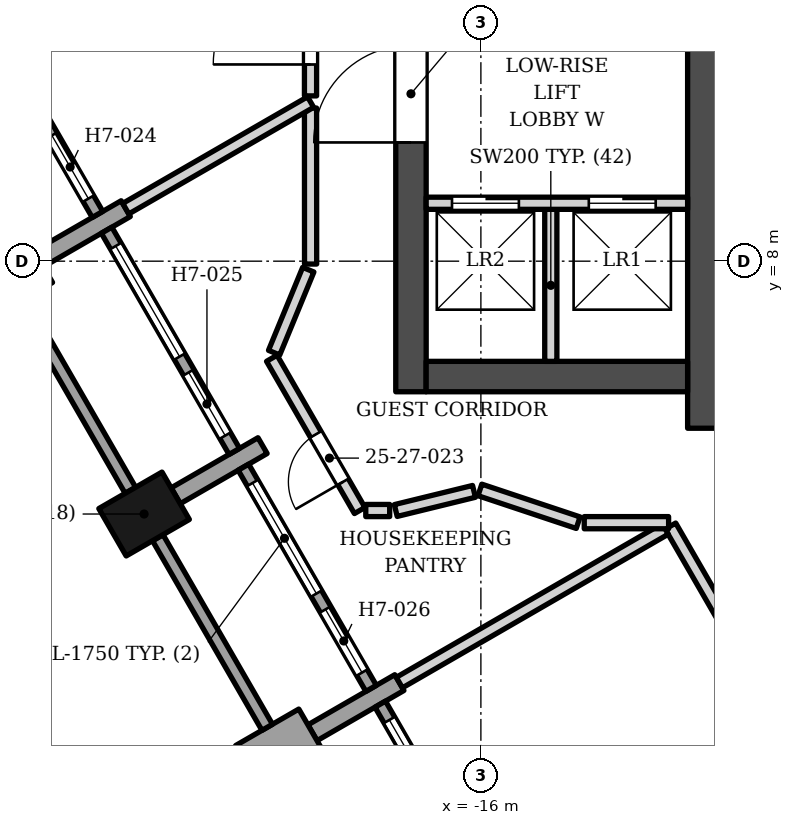
"""IFC4 building model, lengths in metres.
Left out: names, types, materials, properties, quantities, classifications, styles, units other than length and angle.
Written with IfcOpenShell. Run it as: python <this file> out.ifc"""

import sys

from ifc_helpers import new_model, si_unit, direction, frame, frame_2d, origin, origin_2d, place, context, subcontext, project, spatial, rectangle, extrude, element, fill, save


model = new_model("IFC4")
c1 = context("Model", 3, precision=1e-05, world=origin(), true_north=direction((0.0, 1.0)))
c2 = subcontext(c1, "Body", "Model", "MODEL_VIEW")
j1 = project(units=[si_unit("LENGTHUNIT", "METRE"), si_unit("PLANEANGLEUNIT", "RADIAN")], contexts=[c1])
p1 = place(None, origin())
s1 = spatial("IfcSite", under=j1, at=p1, CompositionType="ELEMENT")
p2 = place(p1, origin())
s2 = spatial("IfcBuilding", under=s1, at=p2, CompositionType="ELEMENT")
p3 = place(p2, frame((0.0, 0.0, 112.2)))
s3 = spatial("IfcBuildingStorey", under=s2, at=p3, CompositionType="ELEMENT", Elevation=112.2)
p4 = place(p3, frame((-12.35, 5.253, 0.0), z_axis=(0.0, 0.0, 1.0), x_axis=(0.0, 1.0, 0.0)))
e1 = element("IfcWall", 1, at=p4, inside=s3, PredefinedType="SHEAR", context=c2, shape_type="SweptSolid", body=[
    extrude(rectangle(XDim=13.3, YDim=0.5, at=frame_2d((6.65, 0.0))), origin(), (0.0, 0.0, 1.0), 3.4),
])
p5 = place(p3, frame((-12.6, 6.103, 0.0), z_axis=(0.0, 0.0, 1.0), x_axis=(-1.0, 0.0, 0.0)))
e2 = element("IfcWall", 2, at=p5, inside=s3, PredefinedType="SHEAR", context=c2, shape_type="SweptSolid", body=[
    extrude(rectangle(XDim=4.3, YDim=0.5, at=frame_2d((2.15, 0.0))), origin(), (0.0, 0.0, 1.0), 3.4),
])
p6 = place(p3, frame((-17.15, 5.853, 0.0), z_axis=(0.0, 0.0, 1.0), x_axis=(0.0, 1.0, 0.0)))
e3 = element("IfcWall", 3, at=p6, inside=s3, PredefinedType="SHEAR", context=c2, shape_type="SweptSolid", body=[
    extrude(rectangle(XDim=13.2, YDim=0.5, at=frame_2d((6.6, 0.0))), origin(), (0.0, 0.0, 1.0), 3.4),
])
p7 = place(p6, frame((4.1, 0.0, 0.0)))
e4 = element("IfcOpeningElement", 4, at=p7, cuts=e3, PredefinedType="OPENING", context=c2, shape_type="SweptSolid", body=[
    extrude(rectangle(XDim=1.6, YDim=2.1, at=frame_2d((0.8, 1.05))), frame((0.0, 0.26, 0.0), z_axis=(0.0, -1.0, 0.0), x_axis=(1.0, 0.0, 0.0)), (0.0, 0.0, 1.0), 0.52),
])
p8 = place(p6, frame((9.75, 0.0, 0.0)))
e5 = element("IfcOpeningElement", 5, at=p8, cuts=e3, PredefinedType="OPENING", context=c2, shape_type="SweptSolid", body=[
    extrude(rectangle(XDim=0.9, YDim=2.1, at=frame_2d((0.45, 1.05))), frame((0.0, 0.26, 0.0), z_axis=(0.0, -1.0, 0.0), x_axis=(1.0, 0.0, 0.0)), (0.0, 0.0, 1.0), 0.52),
])
p9 = place(p3, frame((-21.539, 3.842, 0.0), z_axis=(0.0, 0.0, 1.0), x_axis=(0.5, -0.866025403784, 0.0)))
e6 = element("IfcColumn", 6, at=p9, inside=s3, PredefinedType="COLUMN", context=c2, shape_type="SweptSolid", body=[
    extrude(rectangle(XDim=0.9, YDim=1.2, at=origin_2d()), origin(), (0.0, 0.0, 1.0), 3.4),
])
p10 = place(p3, frame((-24.309, 7.439, 0.0), z_axis=(0.0, 0.0, 1.0), x_axis=(0.865955154139, 0.50012165622, 0.0)))
e7 = element("IfcWall", 7, at=p10, inside=s3, PredefinedType="SOLIDWALL", context=c2, shape_type="SweptSolid", body=[
    extrude(rectangle(XDim=1.2, YDim=0.9, at=frame_2d((0.6, 0.0))), origin(), (0.0, 0.0, 1.0), 2.63),
])
p11 = place(p3, frame((-23.27, 8.039, 0.0), z_axis=(0.0, 0.0, 1.0), x_axis=(0.866040211805, 0.499974350878, 0.0)))
e8 = element("IfcWall", 8, at=p11, inside=s3, PredefinedType="SOLIDWALL", context=c2, shape_type="SweptSolid", body=[
    extrude(rectangle(XDim=1.65, YDim=0.3, at=frame_2d((0.825, 0.0))), origin(), (0.0, 0.0, 1.0), 2.65),
])
p12 = place(p3, frame((-21.019, 4.142, 0.0), z_axis=(0.0, 0.0, 1.0), x_axis=(0.866003217194, 0.500038426333, 0.0)))
e9 = element("IfcWall", 9, at=p12, inside=s3, PredefinedType="SOLIDWALL", context=c2, shape_type="SweptSolid", body=[
    extrude(rectangle(XDim=1.65, YDim=0.3, at=frame_2d((0.825, 0.0))), origin(), (0.0, 0.0, 1.0), 2.45),
])
p13 = place(p3, frame((-19.809, -0.355, 0.0), z_axis=(0.0, 0.0, 1.0), x_axis=(0.866043267704, 0.499969057507, 0.0)))
e10 = element("IfcWall", 10, at=p13, inside=s3, PredefinedType="SOLIDWALL", context=c2, shape_type="SweptSolid", body=[
    extrude(rectangle(XDim=1.2, YDim=0.9, at=frame_2d((0.6, 0.0))), origin(), (0.0, 0.0, 1.0), 2.63),
])
p14 = place(p3, frame((-18.77, 0.245, 0.0), z_axis=(0.0, 0.0, 1.0), x_axis=(0.865976140824, 0.500085316245, 0.0)))
e11 = element("IfcWall", 11, at=p14, inside=s3, PredefinedType="SOLIDWALL", context=c2, shape_type="SweptSolid", body=[
    extrude(rectangle(XDim=1.65, YDim=0.3, at=frame_2d((0.825, 0.0))), origin(), (0.0, 0.0, 1.0), 2.65),
])
p15 = place(p3, frame((-24.405, 12.406, 0.0), z_axis=(0.0, 0.0, 1.0), x_axis=(0.500002543286, -0.866023935413, 0.0)))
e12 = element("IfcWall", 12, at=p15, inside=s3, PredefinedType="ELEMENTEDWALL", context=c2, shape_type="SweptSolid", body=[
    extrude(rectangle(XDim=4.2, YDim=0.2, at=frame_2d((2.1, 0.0))), origin(), (0.0, 0.0, 1.0), 2.65),
])
p16 = place(p15, frame((0.3, 0.0, 0.6)))
e13 = element("IfcOpeningElement", 13, at=p16, cuts=e12, PredefinedType="OPENING", context=c2, shape_type="SweptSolid", body=[
    extrude(rectangle(XDim=2.1, YDim=1.8, at=frame_2d((1.05, 0.9))), frame((0.0, 0.11, 0.0), z_axis=(0.0, -1.0, 0.0), x_axis=(1.0, 0.0, 0.0)), (0.0, 0.0, 1.0), 0.22),
])
p17 = place(p15, frame((2.7, 0.0, 0.0)))
e14 = element("IfcOpeningElement", 14, at=p17, cuts=e12, PredefinedType="OPENING", context=c2, shape_type="SweptSolid", body=[
    extrude(rectangle(XDim=1.2, YDim=2.4, at=frame_2d((0.6, 1.2))), frame((0.0, 0.11, 0.0), z_axis=(0.0, -1.0, 0.0), x_axis=(1.0, 0.0, 0.0)), (0.0, 0.0, 1.0), 0.22),
])
p18 = place(p3, frame((-23.564, 7.349, 0.0), z_axis=(0.0, 0.0, 1.0), x_axis=(0.500012057535, -0.866018442252, 0.0)))
e15 = element("IfcWall", 15, at=p18, inside=s3, PredefinedType="SOLIDWALL", context=c2, shape_type="SweptSolid", body=[
    extrude(rectangle(XDim=3.6, YDim=0.2, at=frame_2d((1.8, 0.0))), origin(), (0.0, 0.0, 1.0), 2.63),
])
p19 = place(p3, frame((-22.155, 8.509, 0.0), z_axis=(0.0, 0.0, 1.0), x_axis=(0.500027713859, -0.866009402589, 0.0)))
e16 = element("IfcWall", 16, at=p19, inside=s3, PredefinedType="ELEMENTEDWALL", context=c2, shape_type="SweptSolid", body=[
    extrude(rectangle(XDim=4.2, YDim=0.2, at=frame_2d((2.1, 0.0))), origin(), (0.0, 0.0, 1.0), 2.65),
])
p20 = place(p19, frame((0.3, 0.0, 0.6)))
e17 = element("IfcOpeningElement", 17, at=p20, cuts=e16, PredefinedType="OPENING", context=c2, shape_type="SweptSolid", body=[
    extrude(rectangle(XDim=2.1, YDim=1.8, at=frame_2d((1.05, 0.9))), frame((0.0, 0.11, 0.0), z_axis=(0.0, -1.0, 0.0), x_axis=(1.0, 0.0, 0.0)), (0.0, 0.0, 1.0), 0.22),
])
p21 = place(p19, frame((2.7, 0.0, 0.0)))
e18 = element("IfcOpeningElement", 18, at=p21, cuts=e16, PredefinedType="OPENING", context=c2, shape_type="SweptSolid", body=[
    extrude(rectangle(XDim=1.2, YDim=2.4, at=frame_2d((0.6, 1.2))), frame((0.0, 0.11, 0.0), z_axis=(0.0, -1.0, 0.0), x_axis=(1.0, 0.0, 0.0)), (0.0, 0.0, 1.0), 0.22),
])
p22 = place(p3, frame((-21.314, 3.452, 0.0), z_axis=(0.0, 0.0, 1.0), x_axis=(0.500012057535, -0.866018442252, 0.0)))
e19 = element("IfcWall", 19, at=p22, inside=s3, PredefinedType="SOLIDWALL", context=c2, shape_type="SweptSolid", body=[
    extrude(rectangle(XDim=3.6, YDim=0.2, at=frame_2d((1.8, 0.0))), origin(), (0.0, 0.0, 1.0), 2.63),
])
p23 = place(p3, frame((-19.905, 4.612, 0.0), z_axis=(0.0, 0.0, 1.0), x_axis=(0.500027713859, -0.866009402589, 0.0)))
e20 = element("IfcWall", 20, at=p23, inside=s3, PredefinedType="ELEMENTEDWALL", context=c2, shape_type="SweptSolid", body=[
    extrude(rectangle(XDim=4.2, YDim=0.2, at=frame_2d((2.1, 0.0))), origin(), (0.0, 0.0, 1.0), 2.45),
])
p24 = place(p23, frame((0.3, 0.0, 0.6)))
e21 = element("IfcOpeningElement", 21, at=p24, cuts=e20, PredefinedType="OPENING", context=c2, shape_type="SweptSolid", body=[
    extrude(rectangle(XDim=2.1, YDim=1.75, at=frame_2d((1.05, 0.875))), frame((0.0, 0.11, 0.0), z_axis=(0.0, -1.0, 0.0), x_axis=(1.0, 0.0, 0.0)), (0.0, 0.0, 1.0), 0.22),
])
p25 = place(p23, frame((2.7, 0.0, 0.0)))
e22 = element("IfcOpeningElement", 22, at=p25, cuts=e20, PredefinedType="OPENING", context=c2, shape_type="SweptSolid", body=[
    extrude(rectangle(XDim=1.2, YDim=2.35, at=frame_2d((0.6, 1.175))), frame((0.0, 0.11, 0.0), z_axis=(0.0, -1.0, 0.0), x_axis=(1.0, 0.0, 0.0)), (0.0, 0.0, 1.0), 0.22),
])
p26 = place(p3, frame((-17.655, 0.715, 0.0), z_axis=(0.0, 0.0, 1.0), x_axis=(0.500002543286, -0.866023935413, 0.0)))
e23 = element("IfcWall", 23, at=p26, inside=s3, PredefinedType="ELEMENTEDWALL", context=c2, shape_type="SweptSolid", body=[
    extrude(rectangle(XDim=4.2, YDim=0.2, at=frame_2d((2.1, 0.0))), origin(), (0.0, 0.0, 1.0), 2.65),
])
p27 = place(p26, frame((0.3, 0.0, 0.6)))
e24 = element("IfcOpeningElement", 24, at=p27, cuts=e23, PredefinedType="OPENING", context=c2, shape_type="SweptSolid", body=[
    extrude(rectangle(XDim=2.1, YDim=1.8, at=frame_2d((1.05, 0.9))), frame((0.0, 0.11, 0.0), z_axis=(0.0, -1.0, 0.0), x_axis=(1.0, 0.0, 0.0)), (0.0, 0.0, 1.0), 0.22),
])
p28 = place(p26, frame((2.7, 0.0, 0.0)))
e25 = element("IfcOpeningElement", 25, at=p28, cuts=e23, PredefinedType="OPENING", context=c2, shape_type="SweptSolid", body=[
    extrude(rectangle(XDim=1.2, YDim=2.4, at=frame_2d((0.6, 1.2))), frame((0.0, 0.11, 0.0), z_axis=(0.0, -1.0, 0.0), x_axis=(1.0, 0.0, 0.0)), (0.0, 0.0, 1.0), 0.22),
])
p29 = place(p3, frame((-14.85, 6.353, 0.0), z_axis=(0.0, 0.0, 1.0), x_axis=(0.0, 1.0, 0.0)))
e26 = element("IfcWall", 26, at=p29, inside=s3, PredefinedType="SOLIDWALL", context=c2, shape_type="SweptSolid", body=[
    extrude(rectangle(XDim=2.5, YDim=0.2, at=frame_2d((1.25, 0.0))), origin(), (0.0, 0.0, 1.0), 3.23),
])
p30 = place(p3, frame((-16.9, 8.953, 0.0), z_axis=(0.0, 0.0, 1.0), x_axis=(1.0, 0.0, 0.0)))
e27 = element("IfcWall", 27, at=p30, inside=s3, PredefinedType="SOLIDWALL", context=c2, shape_type="SweptSolid", body=[
    extrude(rectangle(XDim=4.3, YDim=0.2, at=frame_2d((2.15, 0.0))), origin(), (0.0, 0.0, 1.0), 3.23),
])
p31 = place(p30, frame((2.675, 0.0, 0.0)))
e28 = element("IfcOpeningElement", 28, at=p31, cuts=e27, PredefinedType="OPENING", context=c2, shape_type="SweptSolid", body=[
    extrude(rectangle(XDim=1.1, YDim=2.1, at=frame_2d((0.55, 1.05))), frame((0.0, 0.11, 0.0), z_axis=(0.0, -1.0, 0.0), x_axis=(1.0, 0.0, 0.0)), (0.0, 0.0, 1.0), 0.22),
])
p32 = place(p30, frame((0.425, 0.0, 0.0)))
e29 = element("IfcOpeningElement", 29, at=p32, cuts=e27, PredefinedType="OPENING", context=c2, shape_type="SweptSolid", body=[
    extrude(rectangle(XDim=1.1, YDim=2.1, at=frame_2d((0.55, 1.05))), frame((0.0, 0.11, 0.0), z_axis=(0.0, -1.0, 0.0), x_axis=(1.0, 0.0, 0.0)), (0.0, 0.0, 1.0), 0.22),
])
p33 = place(p3, frame((-12.882, 3.644, 0.0), z_axis=(0.0, 0.0, 1.0), x_axis=(0.500000325599, -0.866025215799, 0.0)))
e30 = element("IfcWall", 30, at=p33, inside=s3, PredefinedType="PARTITIONING", context=c2, shape_type="SweptSolid", body=[
    extrude(rectangle(XDim=25.63, YDim=0.2, at=frame_2d((12.815, 0.0))), origin(), (0.0, 0.0, 1.0), 2.384),
])
p34 = place(p33, frame((4.0, 0.0, 0.0)))
e31 = element("IfcOpeningElement", 31, at=p34, cuts=e30, PredefinedType="OPENING", context=c2, shape_type="SweptSolid", body=[
    extrude(rectangle(XDim=1.0, YDim=2.1, at=frame_2d((0.5, 1.05))), frame((0.0, 0.11, 0.0), z_axis=(0.0, -1.0, 0.0), x_axis=(1.0, 0.0, 0.0)), (0.0, 0.0, 1.0), 0.22),
])
p35 = place(p33, frame((14.95, 0.0, 0.0)))
e32 = element("IfcOpeningElement", 32, at=p35, cuts=e30, PredefinedType="OPENING", context=c2, shape_type="SweptSolid", body=[
    extrude(rectangle(XDim=1.6, YDim=2.1, at=frame_2d((0.8, 1.05))), frame((0.0, 0.11, 0.0), z_axis=(0.0, -1.0, 0.0), x_axis=(1.0, 0.0, 0.0)), (0.0, 0.0, 1.0), 0.22),
])
p36 = place(p33, frame((23.515, 0.0, 0.0)))
e33 = element("IfcOpeningElement", 33, at=p36, cuts=e30, PredefinedType="OPENING", context=c2, shape_type="SweptSolid", body=[
    extrude(rectangle(XDim=1.1, YDim=2.1, at=frame_2d((0.55, 1.05))), frame((0.0, 0.11, 0.0), z_axis=(0.0, -1.0, 0.0), x_axis=(1.0, 0.0, 0.0)), (0.0, 0.0, 1.0), 0.22),
])
p37 = place(p3, frame((-17.341, 1.07, 0.0), z_axis=(0.0, 0.0, 1.0), x_axis=(0.865894858421, 0.500226043064, 0.0)))
e34 = element("IfcWall", 34, at=p37, inside=s3, PredefinedType="PARTITIONING", context=c2, shape_type="SweptSolid", body=[
    extrude(rectangle(XDim=5.05, YDim=0.2, at=frame_2d((2.525, 0.0))), origin(), (0.0, 0.0, 1.0), 2.474),
])
p38 = place(p3, frame((-16.016, 4.238, 0.0), z_axis=(0.0, 0.0, 1.0), x_axis=(0.948654629562, -0.31631375849, 0.0)))
e35 = element("IfcWall", 35, at=p38, inside=s3, PredefinedType="PARTITIONING", context=c2, shape_type="SweptSolid", body=[
    extrude(rectangle(XDim=1.703, YDim=0.2, at=frame_2d((0.852, 0.0))), origin(), (0.0, 0.0, 1.0), 3.23),
])
p39 = place(p3, frame((-14.3, 3.699, 0.0), z_axis=(0.0, 0.0, 1.0), x_axis=(1.0, 0.0, 0.0)))
e36 = element("IfcWall", 36, at=p39, inside=s3, PredefinedType="PARTITIONING", context=c2, shape_type="SweptSolid", body=[
    extrude(rectangle(XDim=1.387, YDim=0.2, at=frame_2d((0.694, 0.0))), origin(), (0.0, 0.0, 1.0), 2.474),
])
p40 = place(p3, frame((-19.439, 6.403, 0.0), z_axis=(0.0, 0.0, 1.0), x_axis=(0.500017289984, -0.866015421177, 0.0)))
e37 = element("IfcWall", 37, at=p40, inside=s3, PredefinedType="PARTITIONING", context=c2, shape_type="SweptSolid", body=[
    extrude(rectangle(XDim=2.891, YDim=0.2, at=frame_2d((1.446, 0.0))), origin(), (0.0, 0.0, 1.0), 2.45),
])
p41 = place(p40, frame((1.446, 0.0, 0.0)))
e38 = element("IfcOpeningElement", 38, at=p41, cuts=e37, PredefinedType="OPENING", context=c2, shape_type="SweptSolid", body=[
    extrude(rectangle(XDim=0.9, YDim=2.1, at=frame_2d((0.45, 1.05))), frame((0.0, 0.11, 0.0), z_axis=(0.0, -1.0, 0.0), x_axis=(1.0, 0.0, 0.0)), (0.0, 0.0, 1.0), 0.22),
])
p42 = place(p3, frame((-17.893, 3.899, 0.0), z_axis=(0.0, 0.0, 1.0), x_axis=(1.0, 0.0, 0.0)))
e39 = element("IfcWall", 39, at=p42, inside=s3, PredefinedType="PARTITIONING", context=c2, shape_type="SweptSolid", body=[
    extrude(rectangle(XDim=0.393, YDim=0.2, at=frame_2d((0.197, 0.0))), origin(), (0.0, 0.0, 1.0), 3.23),
])
p43 = place(p3, frame((-17.4, 3.899, 0.0), z_axis=(0.0, 0.0, 1.0), x_axis=(0.971323377413, 0.237762268854, 0.0)))
e40 = element("IfcWall", 40, at=p43, inside=s3, PredefinedType="PARTITIONING", context=c2, shape_type="SweptSolid", body=[
    extrude(rectangle(XDim=1.325, YDim=0.2, at=frame_2d((0.662, 0.0))), origin(), (0.0, 0.0, 1.0), 3.23),
])
p44 = place(p3, frame((-19.4, 6.496, 0.0), z_axis=(0.0, 0.0, 1.0), x_axis=(0.380699876076, 0.924698655971, 0.0)))
e41 = element("IfcWall", 41, at=p44, inside=s3, PredefinedType="PARTITIONING", context=c2, shape_type="SweptSolid", body=[
    extrude(rectangle(XDim=1.476, YDim=0.2, at=frame_2d((0.738, 0.0))), origin(), (0.0, 0.0, 1.0), 3.23),
])
p45 = place(p3, frame((-18.802, 10.518, 0.0), z_axis=(0.0, 0.0, 1.0), x_axis=(0.000570993436, -0.999999836983, 0.0)))
e42 = element("IfcWall", 42, at=p45, inside=s3, PredefinedType="PARTITIONING", context=c2, shape_type="SweptSolid", body=[
    extrude(rectangle(XDim=2.565, YDim=0.2, at=frame_2d((1.283, 0.0))), origin(), (0.0, 0.0, 1.0), 3.23),
])
p46 = place(p3, frame((-21.84, 8.864, 0.0), z_axis=(0.0, 0.0, 1.0), x_axis=(0.866284025074, 0.499551787007, 0.0)))
e43 = element("IfcWall", 43, at=p46, inside=s3, PredefinedType="PARTITIONING", context=c2, shape_type="SweptSolid", body=[
    extrude(rectangle(XDim=3.509, YDim=0.2, at=frame_2d((1.754, 0.0))), origin(), (0.0, 0.0, 1.0), 3.23),
])
p47 = place(p3, frame((-18.802, 10.718, 0.0), z_axis=(0.0, 0.0, 1.0), x_axis=(0.000535762045, 0.99999985648, 0.0)))
e44 = element("IfcWall", 44, at=p47, inside=s3, PredefinedType="PARTITIONING", context=c2, shape_type="SweptSolid", body=[
    extrude(rectangle(XDim=2.734, YDim=0.2, at=frame_2d((1.367, 0.0))), origin(), (0.0, 0.0, 1.0), 3.23),
])
p48 = place(p47, frame((0.516, 0.0, 0.0)))
e45 = element("IfcOpeningElement", 45, at=p48, cuts=e44, PredefinedType="OPENING", context=c2, shape_type="SweptSolid", body=[
    extrude(rectangle(XDim=1.6, YDim=2.1, at=frame_2d((0.8, 1.05))), frame((0.0, 0.11, 0.0), z_axis=(0.0, -1.0, 0.0), x_axis=(1.0, 0.0, 0.0)), (0.0, 0.0, 1.0), 0.22),
])
p49 = place(p17, origin())
e46 = element("IfcDoor", 46, at=p49, inside=s3, OperationType="SINGLE_SWING_LEFT", PredefinedType="DOOR", context=c2, shape_type="SweptSolid", body=[
    extrude(rectangle(XDim=1.2, YDim=2.4, at=frame_2d((0.6, 1.2))), frame((0.0, 0.025, 0.0), z_axis=(0.0, -1.0, 0.0), x_axis=(1.0, 0.0, 0.0)), (0.0, 0.0, 1.0), 0.05),
])
fill(e14, e46)
p50 = place(p20, origin())
e47 = element("IfcWindow", 47, at=p50, inside=s3, PartitioningType="SINGLE_PANEL", PredefinedType="WINDOW", context=c2, shape_type="SweptSolid", body=[
    extrude(rectangle(XDim=2.1, YDim=1.8, at=frame_2d((1.05, 0.9))), frame((0.0, 0.03, 0.0), z_axis=(0.0, -1.0, 0.0), x_axis=(1.0, 0.0, 0.0)), (0.0, 0.0, 1.0), 0.06),
])
fill(e17, e47)
p51 = place(p21, origin())
e48 = element("IfcDoor", 48, at=p51, inside=s3, OperationType="SINGLE_SWING_LEFT", PredefinedType="DOOR", context=c2, shape_type="SweptSolid", body=[
    extrude(rectangle(XDim=1.2, YDim=2.4, at=frame_2d((0.6, 1.2))), frame((0.0, 0.025, 0.0), z_axis=(0.0, -1.0, 0.0), x_axis=(1.0, 0.0, 0.0)), (0.0, 0.0, 1.0), 0.05),
])
fill(e18, e48)
p52 = place(p24, origin())
e49 = element("IfcWindow", 49, at=p52, inside=s3, PartitioningType="SINGLE_PANEL", PredefinedType="WINDOW", context=c2, shape_type="SweptSolid", body=[
    extrude(rectangle(XDim=2.1, YDim=1.75, at=frame_2d((1.05, 0.875))), frame((0.0, 0.03, 0.0), z_axis=(0.0, -1.0, 0.0), x_axis=(1.0, 0.0, 0.0)), (0.0, 0.0, 1.0), 0.06),
])
fill(e21, e49)
p53 = place(p25, origin())
e50 = element("IfcDoor", 50, at=p53, inside=s3, OperationType="SINGLE_SWING_LEFT", PredefinedType="DOOR", context=c2, shape_type="SweptSolid", body=[
    extrude(rectangle(XDim=1.2, YDim=2.35, at=frame_2d((0.6, 1.175))), frame((0.0, 0.025, 0.0), z_axis=(0.0, -1.0, 0.0), x_axis=(1.0, 0.0, 0.0)), (0.0, 0.0, 1.0), 0.05),
])
fill(e22, e50)
p54 = place(p27, origin())
e51 = element("IfcWindow", 51, at=p54, inside=s3, PartitioningType="SINGLE_PANEL", PredefinedType="WINDOW", context=c2, shape_type="SweptSolid", body=[
    extrude(rectangle(XDim=2.1, YDim=1.8, at=frame_2d((1.05, 0.9))), frame((0.0, 0.03, 0.0), z_axis=(0.0, -1.0, 0.0), x_axis=(1.0, 0.0, 0.0)), (0.0, 0.0, 1.0), 0.06),
])
fill(e24, e51)
p55 = place(p31, origin())
e52 = element("IfcDoor", 52, at=p55, inside=s3, OperationType="DOUBLE_DOOR_SLIDING", PredefinedType="DOOR", context=c2, shape_type="SweptSolid", body=[
    extrude(rectangle(XDim=1.1, YDim=2.1, at=frame_2d((0.55, 1.05))), frame((0.0, 0.025, 0.0), z_axis=(0.0, -1.0, 0.0), x_axis=(1.0, 0.0, 0.0)), (0.0, 0.0, 1.0), 0.05),
])
fill(e28, e52)
p56 = place(p32, origin())
e53 = element("IfcDoor", 53, at=p56, inside=s3, OperationType="DOUBLE_DOOR_SLIDING", PredefinedType="DOOR", context=c2, shape_type="SweptSolid", body=[
    extrude(rectangle(XDim=1.1, YDim=2.1, at=frame_2d((0.55, 1.05))), frame((0.0, 0.025, 0.0), z_axis=(0.0, -1.0, 0.0), x_axis=(1.0, 0.0, 0.0)), (0.0, 0.0, 1.0), 0.05),
])
fill(e29, e53)
p57 = place(p7, origin())
e54 = element("IfcDoor", 54, at=p57, inside=s3, OperationType="DOUBLE_DOOR_SINGLE_SWING", PredefinedType="DOOR", context=c2, shape_type="SweptSolid", body=[
    extrude(rectangle(XDim=1.6, YDim=2.1, at=frame_2d((0.8, 1.05))), frame((0.0, 0.025, 0.0), z_axis=(0.0, -1.0, 0.0), x_axis=(1.0, 0.0, 0.0)), (0.0, 0.0, 1.0), 0.05),
])
fill(e4, e54)
p58 = place(p48, origin())
e55 = element("IfcDoor", 55, at=p58, inside=s3, OperationType="DOUBLE_DOOR_SINGLE_SWING", PredefinedType="DOOR", context=c2, shape_type="SweptSolid", body=[
    extrude(rectangle(XDim=1.6, YDim=2.1, at=frame_2d((0.8, 1.05))), frame((0.0, 0.025, 0.0), z_axis=(0.0, -1.0, 0.0), x_axis=(1.0, 0.0, 0.0)), (0.0, 0.0, 1.0), 0.05),
])
fill(e45, e55)
p59 = place(p41, origin())
e56 = element("IfcDoor", 56, at=p59, inside=s3, OperationType="SINGLE_SWING_RIGHT", PredefinedType="DOOR", context=c2, shape_type="SweptSolid", body=[
    extrude(rectangle(XDim=0.9, YDim=2.1, at=frame_2d((0.45, 1.05))), frame((0.0, 0.025, 0.0), z_axis=(0.0, -1.0, 0.0), x_axis=(1.0, 0.0, 0.0)), (0.0, 0.0, 1.0), 0.05),
])
fill(e38, e56)
save(model, sys.argv[1])
